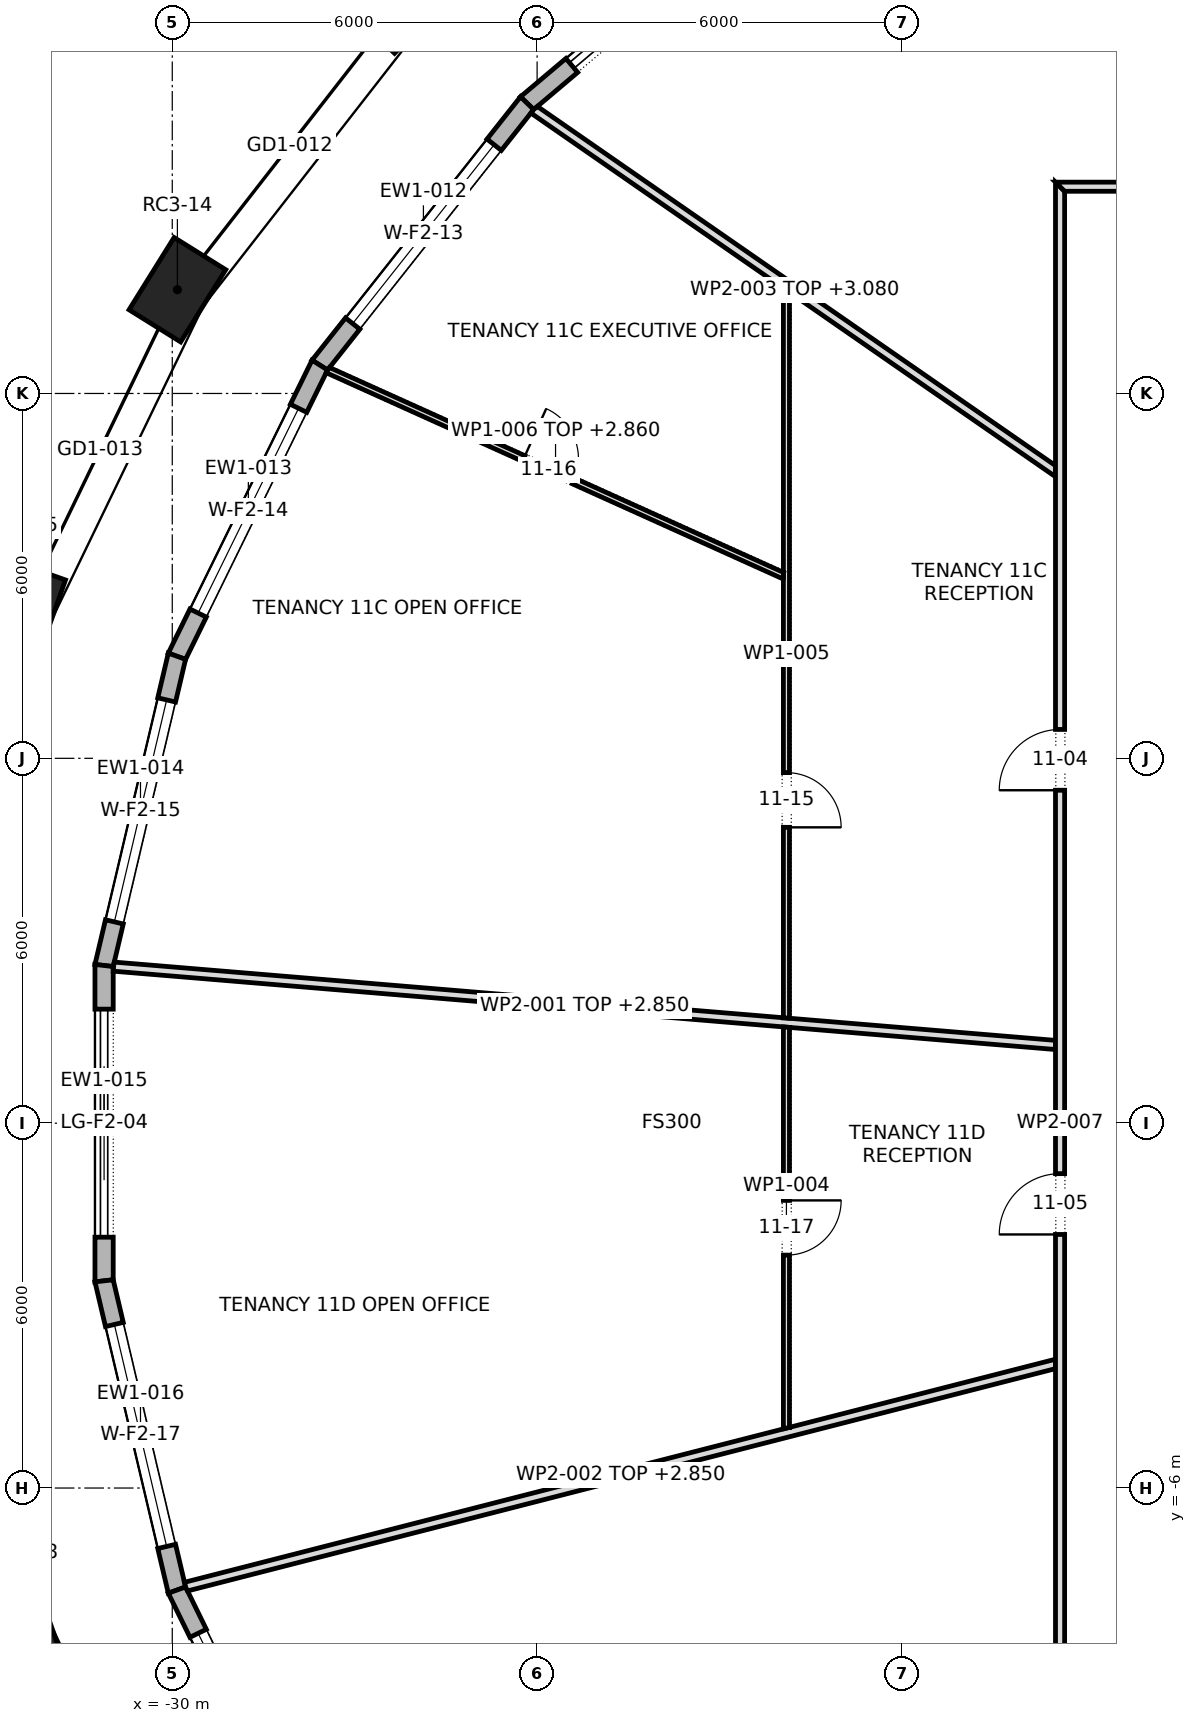
"""IFC4 building model, lengths in metres.
Left out: names, types, materials, properties, quantities, classifications, styles, units other than length and angle.
Written with IfcOpenShell. Run it as: python <this file> out.ifc"""

import sys

from ifc_helpers import new_model, si_unit, direction, frame, frame_2d, origin, origin_2d, place, context, subcontext, project, spatial, polyline, rectangle, outline, extrude, element, fill, save


model = new_model("IFC4")
c1 = context("Model", 3, precision=1e-05, world=origin(), true_north=direction((0.0, 1.0)))
c2 = subcontext(c1, "Body", "Model", "MODEL_VIEW")
j1 = project(units=[si_unit("LENGTHUNIT", "METRE"), si_unit("PLANEANGLEUNIT", "RADIAN")], contexts=[c1])
p1 = place(None, origin())
s1 = spatial("IfcSite", under=j1, at=p1, CompositionType="ELEMENT")
p2 = place(p1, origin())
s2 = spatial("IfcBuilding", under=s1, at=p2, CompositionType="ELEMENT")
p3 = place(p2, frame((0.0, 0.0, 163.3)))
s3 = spatial("IfcBuildingStorey", under=s2, at=p3, CompositionType="ELEMENT", Elevation=163.3)
for number, where, z_axis, x_axis in (
    (1, (-26.221, 18.445, 0.0), (0.0, 0.0, 1.0), (-0.692, -0.722, 0.0)),
    (2, (-29.916, 13.706, 0.0), (0.0, 0.0, 1.0), (-0.529, -0.849, 0.0)),
    (3, (-32.46, 8.44, 0.0), (0.0, 0.0, 1.0), (-0.334, -0.943, 0.0)),
    (4, (-32.46, -8.44, 0.0), (0.0, 0.0, 1.0), (0.334, -0.943, 0.0)),
):
    element("IfcColumn", number, at=place(p3, frame(where, z_axis=z_axis, x_axis=x_axis)), inside=s3, PredefinedType="COLUMN", context=c2, shape_type="SweptSolid", body=[
        extrude(rectangle(XDim=1.4, YDim=1.0, at=origin_2d()), origin(), (0.0, 0.0, 1.0), 4.2),
    ])
p4 = place(p3, frame((-19.829, 20.435, 0.0), z_axis=(0.0, 0.0, 1.0), x_axis=(-0.764076096085, -0.645126126732, 0.0)))
e5 = element("IfcWall", 5, at=p4, inside=s3, PredefinedType="STANDARD", context=c2, shape_type="SweptSolid", body=[
    extrude(outline(polyline([(-0.014, -0.15), (5.69, -0.15), (5.66, 0.15), (0.014, 0.15), (-0.014, -0.15)])), origin(), (0.0, 0.0, 1.0), 3.85),
])
p5 = place(p4, frame((0.962, 0.0, 0.0)))
e6 = element("IfcOpeningElement", 6, at=p5, cuts=e5, PredefinedType="OPENING", context=c2, shape_type="SweptSolid", body=[
    extrude(rectangle(XDim=3.75, YDim=3.45, at=frame_2d((1.875, 1.725))), frame((0.0, 0.162, 0.0), z_axis=(0.0, -1.0, 0.0), x_axis=(1.0, 0.0, 0.0)), (0.0, 0.0, 1.0), 0.324),
])
p6 = place(p3, frame((-24.165, 16.774, 0.0), z_axis=(0.0, 0.0, 1.0), x_axis=(-0.620577705153, -0.784144955902, 0.0)))
e7 = element("IfcWall", 7, at=p6, inside=s3, PredefinedType="STANDARD", context=c2, shape_type="SweptSolid", body=[
    extrude(outline(polyline([(-0.015, -0.15), (5.509, -0.15), (5.477, 0.15), (0.015, 0.15), (-0.015, -0.15)])), origin(), (0.0, 0.0, 1.0), 3.85),
])
p7 = place(p6, frame((0.871, 0.0, 0.6)))
e8 = element("IfcOpeningElement", 8, at=p7, cuts=e7, PredefinedType="OPENING", context=c2, shape_type="SweptSolid", body=[
    extrude(rectangle(XDim=3.75, YDim=2.85, at=frame_2d((1.875, 1.425))), frame((0.0, 0.162, 0.0), z_axis=(0.0, -1.0, 0.0), x_axis=(1.0, 0.0, 0.0)), (0.0, 0.0, 1.0), 0.324),
])
p8 = place(p3, frame((-27.574, 12.467, 0.0), z_axis=(0.0, 0.0, 1.0), x_axis=(-0.440444485575, -0.897779847806, 0.0)))
e9 = element("IfcWall", 9, at=p8, inside=s3, PredefinedType="STANDARD", context=c2, shape_type="SweptSolid", body=[
    extrude(outline(polyline([(-0.016, -0.15), (5.35, -0.15), (5.317, 0.15), (0.016, 0.15), (-0.016, -0.15)])), origin(), (0.0, 0.0, 1.0), 3.85),
])
p9 = place(p8, frame((0.792, 0.0, 0.6)))
e10 = element("IfcOpeningElement", 10, at=p9, cuts=e9, PredefinedType="OPENING", context=c2, shape_type="SweptSolid", body=[
    extrude(rectangle(XDim=3.75, YDim=2.85, at=frame_2d((1.875, 1.425))), frame((0.0, 0.162, 0.0), z_axis=(0.0, -1.0, 0.0), x_axis=(1.0, 0.0, 0.0)), (0.0, 0.0, 1.0), 0.324),
])
p10 = place(p3, frame((-29.923, 7.678, 0.0), z_axis=(0.0, 0.0, 1.0), x_axis=(-0.229297175564, -0.973356463624, 0.0)))
e11 = element("IfcWall", 11, at=p10, inside=s3, PredefinedType="STANDARD", context=c2, shape_type="SweptSolid", body=[
    extrude(outline(polyline([(-0.017, -0.15), (5.242, -0.15), (5.207, 0.15), (0.017, 0.15), (-0.017, -0.15)])), origin(), (0.0, 0.0, 1.0), 3.85),
])
p11 = place(p10, frame((0.737, 0.0, 0.6)))
e12 = element("IfcOpeningElement", 12, at=p11, cuts=e11, PredefinedType="OPENING", context=c2, shape_type="SweptSolid", body=[
    extrude(rectangle(XDim=3.75, YDim=2.85, at=frame_2d((1.875, 1.425))), frame((0.0, 0.162, 0.0), z_axis=(0.0, -1.0, 0.0), x_axis=(1.0, 0.0, 0.0)), (0.0, 0.0, 1.0), 0.324),
])
p12 = place(p3, frame((-31.121, 2.593, 0.0), z_axis=(0.0, 0.0, 1.0), x_axis=(0.0, -1.0, 0.0)))
e13 = element("IfcWall", 13, at=p12, inside=s3, PredefinedType="STANDARD", context=c2, shape_type="SweptSolid", body=[
    extrude(outline(polyline([(-0.017, -0.15), (5.203, -0.15), (5.168, 0.15), (0.017, 0.15), (-0.017, -0.15)])), origin(), (0.0, 0.0, 1.0), 3.85),
])
p13 = place(p12, frame((0.718, 0.0, 0.0)))
e14 = element("IfcOpeningElement", 14, at=p13, cuts=e13, PredefinedType="OPENING", context=c2, shape_type="SweptSolid", body=[
    extrude(rectangle(XDim=3.75, YDim=3.45, at=frame_2d((1.875, 1.725))), frame((0.0, 0.162, 0.0), z_axis=(0.0, -1.0, 0.0), x_axis=(1.0, 0.0, 0.0)), (0.0, 0.0, 1.0), 0.324),
])
p14 = place(p3, frame((-31.121, -2.593, 0.0), z_axis=(0.0, 0.0, 1.0), x_axis=(0.229297175564, -0.973356463624, 0.0)))
e15 = element("IfcWall", 15, at=p14, inside=s3, PredefinedType="STANDARD", context=c2, shape_type="SweptSolid", body=[
    extrude(outline(polyline([(-0.017, -0.15), (5.241, -0.15), (5.208, 0.15), (0.017, 0.15), (-0.017, -0.15)])), origin(), (0.0, 0.0, 1.0), 3.85),
])
p15 = place(p14, frame((0.737, 0.0, 0.6)))
e16 = element("IfcOpeningElement", 16, at=p15, cuts=e15, PredefinedType="OPENING", context=c2, shape_type="SweptSolid", body=[
    extrude(rectangle(XDim=3.75, YDim=2.85, at=frame_2d((1.875, 1.425))), frame((0.0, 0.162, 0.0), z_axis=(0.0, -1.0, 0.0), x_axis=(1.0, 0.0, 0.0)), (0.0, 0.0, 1.0), 0.324),
])
p16 = place(p3, frame((-29.923, -7.678, 0.0), z_axis=(0.0, 0.0, 1.0), x_axis=(0.440444485575, -0.897779847806, 0.0)))
e17 = element("IfcWall", 17, at=p16, inside=s3, PredefinedType="STANDARD", context=c2, shape_type="SweptSolid", body=[
    extrude(outline(polyline([(-0.017, -0.15), (5.35, -0.15), (5.317, 0.15), (0.017, 0.15), (-0.017, -0.15)])), origin(), (0.0, 0.0, 1.0), 3.85),
])
p17 = place(p16, frame((0.792, 0.0, 0.6)))
e18 = element("IfcOpeningElement", 18, at=p17, cuts=e17, PredefinedType="OPENING", context=c2, shape_type="SweptSolid", body=[
    extrude(rectangle(XDim=3.75, YDim=2.85, at=frame_2d((1.875, 1.425))), frame((0.0, 0.162, 0.0), z_axis=(0.0, -1.0, 0.0), x_axis=(1.0, 0.0, 0.0)), (0.0, 0.0, 1.0), 0.324),
])
p18 = place(p3, frame((-30.965, 2.574, 0.0), z_axis=(0.0, 0.0, 1.0), x_axis=(0.996560145348, -0.082872653534, 0.0)))
e19 = element("IfcWall", 19, at=p18, inside=s3, PredefinedType="PARTITIONING", context=c2, shape_type="SweptSolid", body=[
    extrude(outline(polyline([(0.0, -0.075), (1.86, -0.075), (3.72, -0.075), (5.579, -0.075), (7.439, -0.075), (9.299, -0.075), (11.159, -0.075), (11.159, -0.075), (11.159, -0.075), (12.622, -0.075), (14.086, -0.075), (15.549, -0.075), (15.549, -0.069), (15.537, 0.075), (14.045, 0.075), (12.553, 0.075), (11.061, 0.075), (11.046, 0.074), (11.046, 0.075), (9.206, 0.075), (7.366, 0.075), (5.525, 0.075), (3.685, 0.075), (1.845, 0.075), (0.004, 0.075), (0.0, 0.045), (0.0, -0.075)])), origin(), (0.0, 0.0, 1.0), 2.85),
])
p19 = place(p3, frame((-29.781, -7.623, 0.0), z_axis=(0.0, 0.0, 1.0), x_axis=(0.968729735343, 0.248118318272, 0.0)))
e20 = element("IfcWall", 20, at=p19, inside=s3, PredefinedType="PARTITIONING", context=c2, shape_type="SweptSolid", body=[
    extrude(outline(polyline([(0.013, -0.075), (1.855, -0.075), (3.697, -0.075), (5.539, -0.075), (7.381, -0.075), (9.223, -0.075), (11.064, -0.075), (12.906, -0.075), (14.748, -0.075), (14.786, 0.073), (14.786, 0.075), (13.281, 0.075), (11.776, 0.075), (10.27, 0.075), (10.27, 0.075), (10.27, 0.075), (8.558, 0.075), (6.847, 0.075), (5.135, 0.075), (3.423, 0.075), (1.712, 0.075), (0.0, 0.075), (0.0, 0.071), (0.0, -0.011), (0.013, -0.075)])), origin(), (0.0, 0.0, 1.0), 2.85),
])
p20 = place(p3, frame((-24.059, 16.673, 0.0), z_axis=(0.0, 0.0, 1.0), x_axis=(0.821818585553, -0.569749254006, 0.0)))
e21 = element("IfcWall", 21, at=p20, inside=s3, PredefinedType="PARTITIONING", context=c2, shape_type="SweptSolid", body=[
    extrude(outline(polyline([(0.0, -0.075), (1.724, -0.075), (3.448, -0.075), (5.172, -0.075), (5.173, -0.074), (5.174, -0.075), (6.948, -0.075), (8.723, -0.075), (10.497, -0.075), (10.497, -0.074), (10.394, 0.075), (8.666, 0.075), (6.938, 0.075), (5.209, 0.075), (3.481, 0.075), (1.753, 0.075), (0.025, 0.075), (0.004, -0.002), (0.0, -0.072), (0.0, -0.075)])), origin(), (0.0, 0.0, 1.0), 3.08),
])
p21 = place(p3, frame((-19.9, -5.028, 0.0), z_axis=(0.0, 0.0, 1.0), x_axis=(0.0, 1.0, 0.0)))
e22 = element("IfcWall", 22, at=p21, inside=s3, PredefinedType="PARTITIONING", context=c2, shape_type="SweptSolid", body=[
    extrude(outline(polyline([(0.025, -0.05), (1.67, -0.05), (3.314, -0.05), (4.958, -0.05), (6.603, -0.05), (6.611, 0.048), (6.611, 0.05), (4.958, 0.05), (3.305, 0.05), (1.653, 0.05), (0.0, 0.05), (0.0, 0.049), (0.025, -0.05)])), origin(), (0.0, 0.0, 1.0), 3.85),
])
p22 = place(p21, frame((2.857, 0.0, 0.0)))
e23 = element("IfcOpeningElement", 23, at=p22, cuts=e22, PredefinedType="OPENING", context=c2, shape_type="SweptSolid", body=[
    extrude(rectangle(XDim=0.9, YDim=2.1, at=frame_2d((0.45, 1.05))), frame((0.0, 0.062, 0.0), z_axis=(0.0, -1.0, 0.0), x_axis=(1.0, 0.0, 0.0)), (0.0, 0.0, 1.0), 0.124),
])
p23 = place(p3, frame((-19.9, 1.726, 0.0), z_axis=(0.0, 0.0, 1.0), x_axis=(0.0, 1.0, 0.0)))
e24 = element("IfcWall", 24, at=p23, inside=s3, PredefinedType="PARTITIONING", context=c2, shape_type="SweptSolid", body=[
    extrude(outline(polyline([(0.0, -0.05), (1.99, -0.05), (3.979, -0.05), (5.969, -0.05), (7.959, -0.05), (9.948, -0.05), (11.938, -0.05), (12.007, 0.049), (12.007, 0.05), (10.448, 0.05), (8.89, 0.05), (7.332, 0.05), (7.331, 0.048), (7.326, 0.05), (5.497, 0.05), (3.667, 0.05), (1.838, 0.05), (0.008, 0.05), (0.0, -0.047), (0.0, -0.05)])), origin(), (0.0, 0.0, 1.0), 3.85),
])
p24 = place(p23, frame((3.139, 0.0, 0.0)))
e25 = element("IfcOpeningElement", 25, at=p24, cuts=e24, PredefinedType="OPENING", context=c2, shape_type="SweptSolid", body=[
    extrude(rectangle(XDim=0.9, YDim=2.1, at=frame_2d((0.45, 1.05))), frame((0.0, 0.062, 0.0), z_axis=(0.0, -1.0, 0.0), x_axis=(1.0, 0.0, 0.0)), (0.0, 0.0, 1.0), 0.124),
])
p25 = place(p3, frame((-19.93, 8.993, 0.0), z_axis=(0.0, 0.0, 1.0), x_axis=(-0.911442933079, 0.411426518033, 0.0)))
e26 = element("IfcWall", 26, at=p25, inside=s3, PredefinedType="PARTITIONING", context=c2, shape_type="SweptSolid", body=[
    extrude(outline(polyline([(0.045, -0.05), (1.683, -0.05), (3.321, -0.05), (4.958, -0.05), (6.596, -0.05), (8.234, -0.05), (8.247, 0.0), (8.248, 0.046), (8.248, 0.05), (6.599, 0.05), (4.949, 0.05), (3.299, 0.05), (1.65, 0.05), (0.0, 0.05), (0.0, 0.049), (0.045, -0.05)])), origin(), (0.0, 0.0, 1.0), 2.86),
])
p26 = place(p25, frame((3.807, 0.0, 0.0)))
e27 = element("IfcOpeningElement", 27, at=p26, cuts=e26, PredefinedType="OPENING", context=c2, shape_type="SweptSolid", body=[
    extrude(rectangle(XDim=0.9, YDim=2.1, at=frame_2d((0.45, 1.05))), frame((0.0, 0.062, 0.0), z_axis=(0.0, -1.0, 0.0), x_axis=(1.0, 0.0, 0.0)), (0.0, 0.0, 1.0), 0.124),
])
p27 = place(p3, frame((-15.4, -15.475, 0.0), z_axis=(0.0, 0.0, 1.0), x_axis=(0.0, 1.0, 0.0)))
e28 = element("IfcWall", 28, at=p27, inside=s3, PredefinedType="PARTITIONING", context=c2, shape_type="SweptSolid", body=[
    extrude(outline(polyline([(0.15, -0.075), (2.066, -0.075), (3.981, -0.075), (5.897, -0.075), (7.812, -0.075), (9.728, -0.075), (11.644, -0.075), (13.56, -0.075), (15.475, -0.075), (17.391, -0.075), (19.306, -0.075), (21.222, -0.075), (23.138, -0.075), (25.053, -0.075), (26.969, -0.075), (28.885, -0.075), (30.8, -0.075), (30.95, 0.075), (29.016, 0.075), (27.081, 0.075), (25.147, 0.075), (23.212, 0.075), (21.278, 0.075), (19.344, 0.075), (17.409, 0.075), (15.475, 0.075), (13.541, 0.075), (11.606, 0.075), (9.672, 0.075), (7.738, 0.075), (5.803, 0.075), (3.869, 0.075), (1.935, 0.075), (0.0, 0.075), (0.15, -0.075)])), origin(), (0.0, 0.0, 1.0), 3.85),
])
p28 = place(p27, frame((20.95, 0.0, 0.0)))
e29 = element("IfcOpeningElement", 29, at=p28, cuts=e28, PredefinedType="OPENING", context=c2, shape_type="SweptSolid", body=[
    extrude(rectangle(XDim=1.0, YDim=2.1, at=frame_2d((0.5, 1.05))), frame((0.0, 0.087, 0.0), z_axis=(0.0, -1.0, 0.0), x_axis=(1.0, 0.0, 0.0)), (0.0, 0.0, 1.0), 0.174),
])
p29 = place(p27, frame((13.645, 0.0, 0.0)))
e30 = element("IfcOpeningElement", 30, at=p29, cuts=e28, PredefinedType="OPENING", context=c2, shape_type="SweptSolid", body=[
    extrude(rectangle(XDim=1.0, YDim=2.1, at=frame_2d((0.5, 1.05))), frame((0.0, 0.087, 0.0), z_axis=(0.0, -1.0, 0.0), x_axis=(1.0, 0.0, 0.0)), (0.0, 0.0, 1.0), 0.174),
])
p30 = place(p27, frame((4.905, 0.0, 0.0)))
e31 = element("IfcOpeningElement", 31, at=p30, cuts=e28, PredefinedType="OPENING", context=c2, shape_type="SweptSolid", body=[
    extrude(rectangle(XDim=1.8, YDim=2.1, at=frame_2d((0.9, 1.05))), frame((0.0, 0.087, 0.0), z_axis=(0.0, -1.0, 0.0), x_axis=(1.0, 0.0, 0.0)), (0.0, 0.0, 1.0), 0.174),
])
p31 = place(p3, frame((-15.475, 15.4, 0.0), z_axis=(0.0, 0.0, 1.0), x_axis=(1.0, 0.0, 0.0)))
e32 = element("IfcWall", 32, at=p31, inside=s3, PredefinedType="PARTITIONING", context=c2, shape_type="SweptSolid", body=[
    extrude(outline(polyline([(17.155, 0.075), (15.249, 0.075), (13.343, 0.075), (11.437, 0.075), (9.531, 0.075), (7.625, 0.075), (5.719, 0.075), (3.812, 0.075), (1.906, 0.075), (0.0, 0.075), (0.15, -0.075), (2.04, -0.075), (3.929, -0.075), (5.818, -0.075), (7.708, -0.075), (9.597, -0.075), (11.487, -0.075), (13.376, -0.075), (15.266, -0.075), (17.155, -0.075), (17.155, 0.075)])), origin(), (0.0, 0.0, 1.0), 3.85),
])
p32 = place(p31, frame((13.05, 0.0, 0.0)))
e33 = element("IfcOpeningElement", 33, at=p32, cuts=e32, PredefinedType="OPENING", context=c2, shape_type="SweptSolid", body=[
    extrude(rectangle(XDim=1.0, YDim=2.1, at=frame_2d((0.5, 1.05))), frame((0.0, 0.087, 0.0), z_axis=(0.0, -1.0, 0.0), x_axis=(1.0, 0.0, 0.0)), (0.0, 0.0, 1.0), 0.174),
])
p33 = place(p31, frame((4.51, 0.0, 0.0)))
e34 = element("IfcOpeningElement", 34, at=p33, cuts=e32, PredefinedType="OPENING", context=c2, shape_type="SweptSolid", body=[
    extrude(rectangle(XDim=1.0, YDim=2.1, at=frame_2d((0.5, 1.05))), frame((0.0, 0.087, 0.0), z_axis=(0.0, -1.0, 0.0), x_axis=(1.0, 0.0, 0.0)), (0.0, 0.0, 1.0), 0.174),
])
p34 = place(p5, origin())
e35 = element("IfcDoor", 35, at=p34, inside=s3, OperationType="DOUBLE_DOOR_SLIDING", PredefinedType="DOOR", context=c2, shape_type="SweptSolid", body=[
    extrude(rectangle(XDim=3.75, YDim=3.45, at=frame_2d((1.875, 1.725))), frame((0.0, 0.025, 0.0), z_axis=(0.0, -1.0, 0.0), x_axis=(1.0, 0.0, 0.0)), (0.0, 0.0, 1.0), 0.05),
])
fill(e6, e35)
p35 = place(p7, origin())
e36 = element("IfcWindow", 36, at=p35, inside=s3, PartitioningType="TRIPLE_PANEL_VERTICAL", PredefinedType="WINDOW", context=c2, shape_type="SweptSolid", body=[
    extrude(rectangle(XDim=3.75, YDim=2.85, at=frame_2d((1.875, 1.425))), frame((0.0, 0.03, 0.0), z_axis=(0.0, -1.0, 0.0), x_axis=(1.0, 0.0, 0.0)), (0.0, 0.0, 1.0), 0.06),
])
fill(e8, e36)
p36 = place(p9, origin())
e37 = element("IfcWindow", 37, at=p36, inside=s3, PartitioningType="TRIPLE_PANEL_VERTICAL", PredefinedType="WINDOW", context=c2, shape_type="SweptSolid", body=[
    extrude(rectangle(XDim=3.75, YDim=2.85, at=frame_2d((1.875, 1.425))), frame((0.0, 0.03, 0.0), z_axis=(0.0, -1.0, 0.0), x_axis=(1.0, 0.0, 0.0)), (0.0, 0.0, 1.0), 0.06),
])
fill(e10, e37)
p37 = place(p11, origin())
e38 = element("IfcWindow", 38, at=p37, inside=s3, PartitioningType="TRIPLE_PANEL_VERTICAL", PredefinedType="WINDOW", context=c2, shape_type="SweptSolid", body=[
    extrude(rectangle(XDim=3.75, YDim=2.85, at=frame_2d((1.875, 1.425))), frame((0.0, 0.03, 0.0), z_axis=(0.0, -1.0, 0.0), x_axis=(1.0, 0.0, 0.0)), (0.0, 0.0, 1.0), 0.06),
])
fill(e12, e38)
p38 = place(p13, origin())
e39 = element("IfcDoor", 39, at=p38, inside=s3, OperationType="DOUBLE_DOOR_SLIDING", PredefinedType="DOOR", context=c2, shape_type="SweptSolid", body=[
    extrude(rectangle(XDim=3.75, YDim=3.45, at=frame_2d((1.875, 1.725))), frame((0.0, 0.025, 0.0), z_axis=(0.0, -1.0, 0.0), x_axis=(1.0, 0.0, 0.0)), (0.0, 0.0, 1.0), 0.05),
])
fill(e14, e39)
p39 = place(p15, origin())
e40 = element("IfcWindow", 40, at=p39, inside=s3, PartitioningType="TRIPLE_PANEL_VERTICAL", PredefinedType="WINDOW", context=c2, shape_type="SweptSolid", body=[
    extrude(rectangle(XDim=3.75, YDim=2.85, at=frame_2d((1.875, 1.425))), frame((0.0, 0.03, 0.0), z_axis=(0.0, -1.0, 0.0), x_axis=(1.0, 0.0, 0.0)), (0.0, 0.0, 1.0), 0.06),
])
fill(e16, e40)
p40 = place(p17, origin())
e41 = element("IfcWindow", 41, at=p40, inside=s3, PartitioningType="TRIPLE_PANEL_VERTICAL", PredefinedType="WINDOW", context=c2, shape_type="SweptSolid", body=[
    extrude(rectangle(XDim=3.75, YDim=2.85, at=frame_2d((1.875, 1.425))), frame((0.0, 0.03, 0.0), z_axis=(0.0, -1.0, 0.0), x_axis=(1.0, 0.0, 0.0)), (0.0, 0.0, 1.0), 0.06),
])
fill(e18, e41)
p41 = place(p28, origin())
e42 = element("IfcDoor", 42, at=p41, inside=s3, OperationType="SINGLE_SWING_RIGHT", PredefinedType="DOOR", context=c2, shape_type="SweptSolid", body=[
    extrude(rectangle(XDim=1.0, YDim=2.1, at=frame_2d((0.5, 1.05))), frame((0.0, 0.025, 0.0), z_axis=(0.0, -1.0, 0.0), x_axis=(1.0, 0.0, 0.0)), (0.0, 0.0, 1.0), 0.05),
])
fill(e29, e42)
p42 = place(p29, origin())
e43 = element("IfcDoor", 43, at=p42, inside=s3, OperationType="SINGLE_SWING_RIGHT", PredefinedType="DOOR", context=c2, shape_type="SweptSolid", body=[
    extrude(rectangle(XDim=1.0, YDim=2.1, at=frame_2d((0.5, 1.05))), frame((0.0, 0.025, 0.0), z_axis=(0.0, -1.0, 0.0), x_axis=(1.0, 0.0, 0.0)), (0.0, 0.0, 1.0), 0.05),
])
fill(e30, e43)
p43 = place(p24, frame((0.9, 0.0, 0.0), z_axis=(0.0, 0.0, 1.0), x_axis=(-1.0, 0.0, 0.0)))
e44 = element("IfcDoor", 44, at=p43, inside=s3, OperationType="SINGLE_SWING_LEFT", PredefinedType="DOOR", context=c2, shape_type="SweptSolid", body=[
    extrude(rectangle(XDim=0.9, YDim=2.1, at=frame_2d((0.45, 1.05))), frame((0.0, 0.025, 0.0), z_axis=(0.0, -1.0, 0.0), x_axis=(1.0, 0.0, 0.0)), (0.0, 0.0, 1.0), 0.05),
])
fill(e25, e44)
p44 = place(p26, frame((0.9, 0.0, 0.0), z_axis=(0.0, 0.0, 1.0), x_axis=(-1.0, 0.0, 0.0)))
e45 = element("IfcDoor", 45, at=p44, inside=s3, OperationType="SINGLE_SWING_RIGHT", PredefinedType="DOOR", context=c2, shape_type="SweptSolid", body=[
    extrude(rectangle(XDim=0.9, YDim=2.1, at=frame_2d((0.45, 1.05))), frame((0.0, 0.025, 0.0), z_axis=(0.0, -1.0, 0.0), x_axis=(1.0, 0.0, 0.0)), (0.0, 0.0, 1.0), 0.05),
])
fill(e27, e45)
p45 = place(p22, frame((0.9, 0.0, 0.0), z_axis=(0.0, 0.0, 1.0), x_axis=(-1.0, 0.0, 0.0)))
e46 = element("IfcDoor", 46, at=p45, inside=s3, OperationType="SINGLE_SWING_RIGHT", PredefinedType="DOOR", context=c2, shape_type="SweptSolid", body=[
    extrude(rectangle(XDim=0.9, YDim=2.1, at=frame_2d((0.45, 1.05))), frame((0.0, 0.025, 0.0), z_axis=(0.0, -1.0, 0.0), x_axis=(1.0, 0.0, 0.0)), (0.0, 0.0, 1.0), 0.05),
])
fill(e23, e46)
save(model, sys.argv[1])
